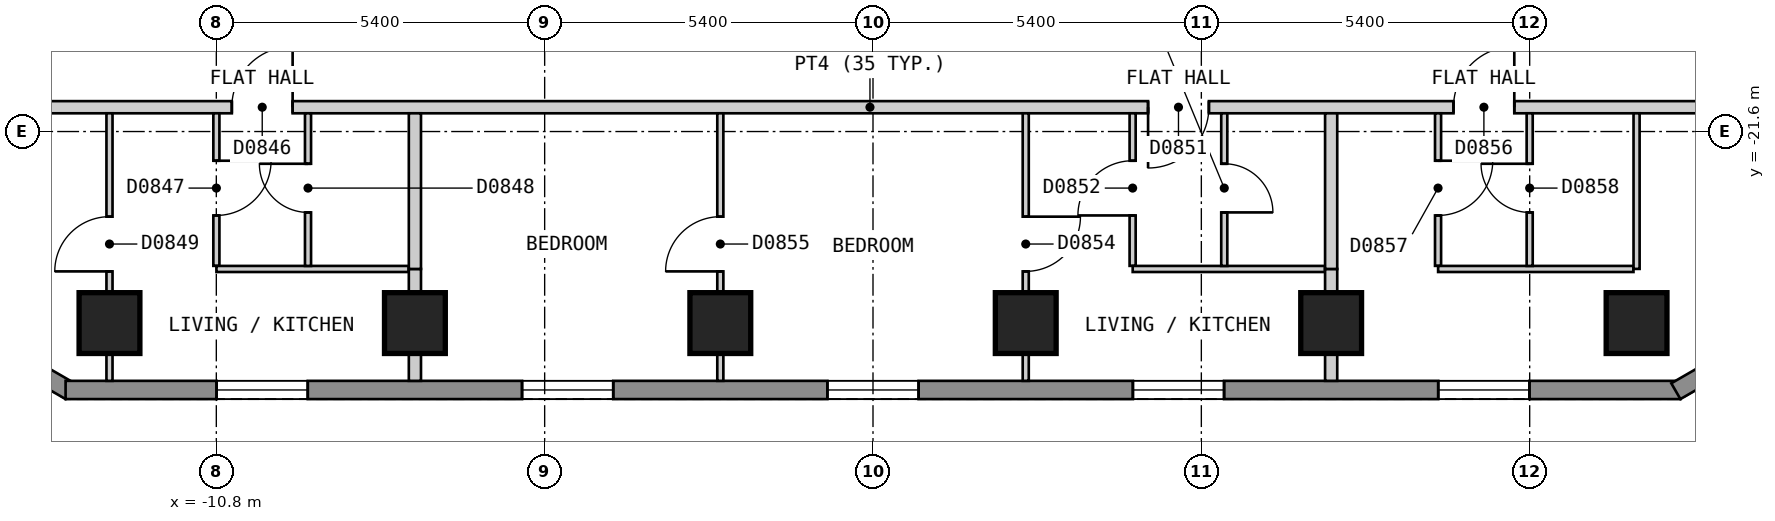
"""IFC4 building model, lengths in metres.
Left out: names, types, materials, properties, quantities, classifications, styles, units other than length and angle.
Written with IfcOpenShell. Run it as: python <this file> out.ifc"""

import sys

from ifc_helpers import new_model, si_unit, direction, frame, frame_2d, origin, origin_2d, place, context, subcontext, project, spatial, polyline, rectangle, outline, extrude, element, fill, save


model = new_model("IFC4")
c1 = context("Model", 3, precision=1e-05, world=origin(), true_north=direction((0.0, 1.0)))
c2 = subcontext(c1, "Body", "Model", "MODEL_VIEW")
j1 = project(units=[si_unit("LENGTHUNIT", "METRE"), si_unit("PLANEANGLEUNIT", "RADIAN")], contexts=[c1])
p1 = place(None, origin())
s1 = spatial("IfcSite", under=j1, at=p1, CompositionType="ELEMENT")
p2 = place(p1, origin())
s2 = spatial("IfcBuilding", under=s1, at=p2, CompositionType="ELEMENT")
p3 = place(p2, frame((0.0, 0.0, 72.0)))
s3 = spatial("IfcBuildingStorey", under=s2, at=p3, CompositionType="ELEMENT", Elevation=72.0)
for number, where, z_axis, x_axis in (
    (1, (-12.557, -24.75, 0.0), (0.0, 0.0, 1.0), (1.0, 0.0, 0.0)),
    (2, (-7.534, -24.75, 0.0), (0.0, 0.0, 1.0), (1.0, 0.0, 0.0)),
    (3, (-2.511, -24.75, 0.0), (0.0, 0.0, 1.0), (1.0, 0.0, 0.0)),
    (4, (2.512, -24.75, 0.0), (0.0, 0.0, 1.0), (1.0, 0.0, 0.0)),
    (5, (7.535, -24.75, 0.0), (0.0, 0.0, 1.0), (1.0, 0.0, 0.0)),
    (6, (12.558, -24.75, 0.0), (0.0, 0.0, 1.0), (1.0, 0.0, 0.0)),
):
    element("IfcColumn", number, at=place(p3, frame(where, z_axis=z_axis, x_axis=x_axis)), inside=s3, PredefinedType="COLUMN", context=c2, shape_type="SweptSolid", body=[
        extrude(rectangle(XDim=1.0, YDim=1.0, at=origin_2d()), origin(), (0.0, 0.0, 1.0), 3.0),
    ])
p4 = place(p3, frame((-17.534, -23.37, 0.0), z_axis=(0.0, 0.0, 1.0), x_axis=(0.866010750942, -0.50002537861, 0.0)))
e7 = element("IfcWall", 7, at=p4, inside=s3, PredefinedType="SOLIDWALL", context=c2, shape_type="SweptSolid", body=[
    extrude(outline(polyline([(0.0, -0.15), (5.0, -0.15), (4.919, 0.15), (0.08, 0.15), (0.0, -0.15)])), origin(), (0.0, 0.0, 1.0), 2.7),
])
p5 = place(p4, frame((0.65, 0.0, 0.15)))
e8 = element("IfcOpeningElement", 8, at=p5, cuts=e7, PredefinedType="OPENING", context=c2, shape_type="SweptSolid", body=[
    extrude(rectangle(XDim=1.2, YDim=2.1, at=frame_2d((0.6, 1.05))), frame((0.0, 0.16, 0.0), z_axis=(0.0, -1.0, 0.0), x_axis=(1.0, 0.0, 0.0)), (0.0, 0.0, 1.0), 0.32),
])
p6 = place(p3, frame((-13.279, -25.85, 0.0), z_axis=(0.0, 0.0, 1.0), x_axis=(1.0, 0.0, 0.0)))
e9 = element("IfcWall", 9, at=p6, inside=s3, PredefinedType="SOLIDWALL", context=c2, shape_type="SweptSolid", body=[
    extrude(outline(polyline([(0.0, -0.15), (26.558, -0.15), (26.478, 0.15), (0.08, 0.15), (0.0, -0.15)])), origin(), (0.0, 0.0, 1.0), 2.7),
])
p7 = place(p6, frame((2.483, 0.0, 0.15)))
e10 = element("IfcOpeningElement", 10, at=p7, cuts=e9, PredefinedType="OPENING", context=c2, shape_type="SweptSolid", body=[
    extrude(rectangle(XDim=1.5, YDim=2.1, at=frame_2d((0.75, 1.05))), frame((0.0, 0.16, 0.0), z_axis=(0.0, -1.0, 0.0), x_axis=(1.0, 0.0, 0.0)), (0.0, 0.0, 1.0), 0.32),
])
p8 = place(p6, frame((7.507, 0.0, 0.15)))
e11 = element("IfcOpeningElement", 11, at=p8, cuts=e9, PredefinedType="OPENING", context=c2, shape_type="SweptSolid", body=[
    extrude(rectangle(XDim=1.5, YDim=2.1, at=frame_2d((0.75, 1.05))), frame((0.0, 0.16, 0.0), z_axis=(0.0, -1.0, 0.0), x_axis=(1.0, 0.0, 0.0)), (0.0, 0.0, 1.0), 0.32),
])
p9 = place(p6, frame((12.529, 0.0, 0.15)))
e12 = element("IfcOpeningElement", 12, at=p9, cuts=e9, PredefinedType="OPENING", context=c2, shape_type="SweptSolid", body=[
    extrude(rectangle(XDim=1.5, YDim=2.1, at=frame_2d((0.75, 1.05))), frame((0.0, 0.16, 0.0), z_axis=(0.0, -1.0, 0.0), x_axis=(1.0, 0.0, 0.0)), (0.0, 0.0, 1.0), 0.32),
])
p10 = place(p6, frame((17.553, 0.0, 0.15)))
e13 = element("IfcOpeningElement", 13, at=p10, cuts=e9, PredefinedType="OPENING", context=c2, shape_type="SweptSolid", body=[
    extrude(rectangle(XDim=1.5, YDim=2.1, at=frame_2d((0.75, 1.05))), frame((0.0, 0.16, 0.0), z_axis=(0.0, -1.0, 0.0), x_axis=(1.0, 0.0, 0.0)), (0.0, 0.0, 1.0), 0.32),
])
p11 = place(p6, frame((22.575, 0.0, 0.15)))
e14 = element("IfcOpeningElement", 14, at=p11, cuts=e9, PredefinedType="OPENING", context=c2, shape_type="SweptSolid", body=[
    extrude(rectangle(XDim=1.5, YDim=2.1, at=frame_2d((0.75, 1.05))), frame((0.0, 0.16, 0.0), z_axis=(0.0, -1.0, 0.0), x_axis=(1.0, 0.0, 0.0)), (0.0, 0.0, 1.0), 0.32),
])
p12 = place(p3, frame((13.204, -25.87, 0.0), z_axis=(0.0, 0.0, 1.0), x_axis=(0.866010750942, 0.50002537861, 0.0)))
e15 = element("IfcWall", 15, at=p12, inside=s3, PredefinedType="SOLIDWALL", context=c2, shape_type="SweptSolid", body=[
    extrude(outline(polyline([(0.0, -0.15), (5.0, -0.15), (4.919, 0.15), (0.08, 0.15), (0.0, -0.15)])), origin(), (0.0, 0.0, 1.0), 2.7),
])
p13 = place(p12, frame((0.65, 0.0, 0.15)))
e16 = element("IfcOpeningElement", 16, at=p13, cuts=e15, PredefinedType="OPENING", context=c2, shape_type="SweptSolid", body=[
    extrude(rectangle(XDim=1.2, YDim=2.1, at=frame_2d((0.6, 1.05))), frame((0.0, 0.16, 0.0), z_axis=(0.0, -1.0, 0.0), x_axis=(1.0, 0.0, 0.0)), (0.0, 0.0, 1.0), 0.32),
])
p14 = place(p3, frame((-15.499, -21.2, 0.0), z_axis=(0.0, 0.0, 1.0), x_axis=(1.0, 0.0, 0.0)))
e17 = element("IfcWall", 17, at=p14, inside=s3, PredefinedType="PARTITIONING", context=c2, shape_type="SweptSolid", body=[
    extrude(rectangle(XDim=30.898, YDim=0.2, at=frame_2d((15.449, 0.0))), origin(), (0.0, 0.0, 1.0), 2.7),
])
p15 = place(p14, frame((4.954, 0.0, 0.0)))
e18 = element("IfcOpeningElement", 18, at=p15, cuts=e17, PredefinedType="OPENING", context=c2, shape_type="SweptSolid", body=[
    extrude(rectangle(XDim=1.0, YDim=2.1, at=frame_2d((0.5, 1.05))), frame((0.0, 0.11, 0.0), z_axis=(0.0, -1.0, 0.0), x_axis=(1.0, 0.0, 0.0)), (0.0, 0.0, 1.0), 0.22),
])
p16 = place(p14, frame((20.023, 0.0, 0.0)))
e19 = element("IfcOpeningElement", 19, at=p16, cuts=e17, PredefinedType="OPENING", context=c2, shape_type="SweptSolid", body=[
    extrude(rectangle(XDim=1.0, YDim=2.1, at=frame_2d((0.5, 1.05))), frame((0.0, 0.11, 0.0), z_axis=(0.0, -1.0, 0.0), x_axis=(1.0, 0.0, 0.0)), (0.0, 0.0, 1.0), 0.22),
])
p17 = place(p14, frame((25.046, 0.0, 0.0)))
e20 = element("IfcOpeningElement", 20, at=p17, cuts=e17, PredefinedType="OPENING", context=c2, shape_type="SweptSolid", body=[
    extrude(rectangle(XDim=1.0, YDim=2.1, at=frame_2d((0.5, 1.05))), frame((0.0, 0.11, 0.0), z_axis=(0.0, -1.0, 0.0), x_axis=(1.0, 0.0, 0.0)), (0.0, 0.0, 1.0), 0.22),
])
p18 = place(p3, frame((-10.799, -21.3, 0.0), z_axis=(0.0, 0.0, 1.0), x_axis=(0.0, -1.0, 0.0)))
e21 = element("IfcWall", 21, at=p18, inside=s3, PredefinedType="PARTITIONING", context=c2, shape_type="SweptSolid", body=[
    extrude(rectangle(XDim=2.509, YDim=0.1, at=frame_2d((1.254, 0.0))), origin(), (0.0, 0.0, 1.0), 2.7),
])
p19 = place(p18, frame((0.78, 0.0, 0.0)))
e22 = element("IfcOpeningElement", 22, at=p19, cuts=e21, PredefinedType="OPENING", context=c2, shape_type="SweptSolid", body=[
    extrude(rectangle(XDim=0.9, YDim=2.1, at=frame_2d((0.45, 1.05))), frame((0.0, 0.06, 0.0), z_axis=(0.0, -1.0, 0.0), x_axis=(1.0, 0.0, 0.0)), (0.0, 0.0, 1.0), 0.12),
])
p20 = place(p3, frame((4.27, -21.3, 0.0), z_axis=(0.0, 0.0, 1.0), x_axis=(0.0, -1.0, 0.0)))
e23 = element("IfcWall", 23, at=p20, inside=s3, PredefinedType="PARTITIONING", context=c2, shape_type="SweptSolid", body=[
    extrude(rectangle(XDim=2.509, YDim=0.1, at=frame_2d((1.254, 0.0))), origin(), (0.0, 0.0, 1.0), 2.7),
])
p21 = place(p20, frame((0.78, 0.0, 0.0)))
e24 = element("IfcOpeningElement", 24, at=p21, cuts=e23, PredefinedType="OPENING", context=c2, shape_type="SweptSolid", body=[
    extrude(rectangle(XDim=0.9, YDim=2.1, at=frame_2d((0.45, 1.05))), frame((0.0, 0.06, 0.0), z_axis=(0.0, -1.0, 0.0), x_axis=(1.0, 0.0, 0.0)), (0.0, 0.0, 1.0), 0.12),
])
p22 = place(p3, frame((9.293, -21.3, 0.0), z_axis=(0.0, 0.0, 1.0), x_axis=(0.0, -1.0, 0.0)))
e25 = element("IfcWall", 25, at=p22, inside=s3, PredefinedType="PARTITIONING", context=c2, shape_type="SweptSolid", body=[
    extrude(rectangle(XDim=2.509, YDim=0.1, at=frame_2d((1.254, 0.0))), origin(), (0.0, 0.0, 1.0), 2.7),
])
p23 = place(p22, frame((0.78, 0.0, 0.0)))
e26 = element("IfcOpeningElement", 26, at=p23, cuts=e25, PredefinedType="OPENING", context=c2, shape_type="SweptSolid", body=[
    extrude(rectangle(XDim=0.9, YDim=2.1, at=frame_2d((0.45, 1.05))), frame((0.0, 0.06, 0.0), z_axis=(0.0, -1.0, 0.0), x_axis=(1.0, 0.0, 0.0)), (0.0, 0.0, 1.0), 0.12),
])
for number, where, z_axis, x_axis in (
    (27, (-10.798, -23.86, 0.0), (0.0, 0.0, 1.0), (1.0, 0.0, 0.0)),
    (28, (4.271, -23.86, 0.0), (0.0, 0.0, 1.0), (1.0, 0.0, 0.0)),
):
    element("IfcWall", number, at=place(p3, frame(where, z_axis=z_axis, x_axis=x_axis)), inside=s3, PredefinedType="PARTITIONING", context=c2, shape_type="SweptSolid", body=[
        extrude(rectangle(XDim=3.164, YDim=0.1, at=frame_2d((1.582, 0.0))), origin(), (0.0, 0.0, 1.0), 2.7),
    ])
p24 = place(p3, frame((9.294, -23.86, 0.0), z_axis=(0.0, 0.0, 1.0), x_axis=(1.0, 0.0, 0.0)))
e29 = element("IfcWall", 29, at=p24, inside=s3, PredefinedType="PARTITIONING", context=c2, shape_type="SweptSolid", body=[
    extrude(rectangle(XDim=3.213, YDim=0.1, at=frame_2d((1.606, 0.0))), origin(), (0.0, 0.0, 1.0), 2.7),
])
p25 = place(p3, frame((5.777, -23.81, 0.0), z_axis=(0.0, 0.0, 1.0), x_axis=(0.0, 1.0, 0.0)))
e30 = element("IfcWall", 30, at=p25, inside=s3, PredefinedType="PARTITIONING", context=c2, shape_type="SweptSolid", body=[
    extrude(rectangle(XDim=2.51, YDim=0.1, at=frame_2d((1.255, 0.0))), origin(), (0.0, 0.0, 1.0), 2.7),
])
p26 = place(p25, frame((0.88, 0.0, 0.0)))
e31 = element("IfcOpeningElement", 31, at=p26, cuts=e30, PredefinedType="OPENING", context=c2, shape_type="SweptSolid", body=[
    extrude(rectangle(XDim=0.8, YDim=2.1, at=frame_2d((0.4, 1.05))), frame((0.0, 0.06, 0.0), z_axis=(0.0, -1.0, 0.0), x_axis=(1.0, 0.0, 0.0)), (0.0, 0.0, 1.0), 0.12),
])
p27 = place(p3, frame((10.8, -23.81, 0.0), z_axis=(0.0, 0.0, 1.0), x_axis=(0.0, 1.0, 0.0)))
e32 = element("IfcWall", 32, at=p27, inside=s3, PredefinedType="PARTITIONING", context=c2, shape_type="SweptSolid", body=[
    extrude(rectangle(XDim=2.51, YDim=0.1, at=frame_2d((1.255, 0.0))), origin(), (0.0, 0.0, 1.0), 2.7),
])
p28 = place(p27, frame((0.88, 0.0, 0.0)))
e33 = element("IfcOpeningElement", 33, at=p28, cuts=e32, PredefinedType="OPENING", context=c2, shape_type="SweptSolid", body=[
    extrude(rectangle(XDim=0.8, YDim=2.1, at=frame_2d((0.4, 1.05))), frame((0.0, 0.06, 0.0), z_axis=(0.0, -1.0, 0.0), x_axis=(1.0, 0.0, 0.0)), (0.0, 0.0, 1.0), 0.12),
])
p29 = place(p3, frame((12.558, -23.859, 0.0), z_axis=(0.0, 0.0, 1.0), x_axis=(0.0, 1.0, 0.0)))
e34 = element("IfcWall", 34, at=p29, inside=s3, PredefinedType="PARTITIONING", context=c2, shape_type="SweptSolid", body=[
    extrude(rectangle(XDim=2.559, YDim=0.1, at=frame_2d((1.279, 0.0))), origin(), (0.0, 0.0, 1.0), 2.7),
])
p30 = place(p3, frame((2.512, -25.7, 0.0), z_axis=(0.0, 0.0, 1.0), x_axis=(0.0, 1.0, 0.0)))
e35 = element("IfcWall", 35, at=p30, inside=s3, PredefinedType="PARTITIONING", context=c2, shape_type="SweptSolid", body=[
    extrude(rectangle(XDim=4.4, YDim=0.1, at=frame_2d((2.2, 0.0))), origin(), (0.0, 0.0, 1.0), 2.7),
])
p31 = place(p30, frame((1.8, 0.0, 0.0)))
e36 = element("IfcOpeningElement", 36, at=p31, cuts=e35, PredefinedType="OPENING", context=c2, shape_type="SweptSolid", body=[
    extrude(rectangle(XDim=0.9, YDim=2.1, at=frame_2d((0.45, 1.05))), frame((0.0, 0.06, 0.0), z_axis=(0.0, -1.0, 0.0), x_axis=(1.0, 0.0, 0.0)), (0.0, 0.0, 1.0), 0.12),
])
p32 = place(p3, frame((-9.292, -23.81, 0.0), z_axis=(0.0, 0.0, 1.0), x_axis=(0.0, 1.0, 0.0)))
e37 = element("IfcWall", 37, at=p32, inside=s3, PredefinedType="PARTITIONING", context=c2, shape_type="SweptSolid", body=[
    extrude(rectangle(XDim=2.51, YDim=0.1, at=frame_2d((1.255, 0.0))), origin(), (0.0, 0.0, 1.0), 2.7),
])
p33 = place(p32, frame((0.88, 0.0, 0.0)))
e38 = element("IfcOpeningElement", 38, at=p33, cuts=e37, PredefinedType="OPENING", context=c2, shape_type="SweptSolid", body=[
    extrude(rectangle(XDim=0.8, YDim=2.1, at=frame_2d((0.4, 1.05))), frame((0.0, 0.06, 0.0), z_axis=(0.0, -1.0, 0.0), x_axis=(1.0, 0.0, 0.0)), (0.0, 0.0, 1.0), 0.12),
])
p34 = place(p3, frame((-12.557, -25.7, 0.0), z_axis=(0.0, 0.0, 1.0), x_axis=(0.0, 1.0, 0.0)))
e39 = element("IfcWall", 39, at=p34, inside=s3, PredefinedType="PARTITIONING", context=c2, shape_type="SweptSolid", body=[
    extrude(rectangle(XDim=4.4, YDim=0.1, at=frame_2d((2.2, 0.0))), origin(), (0.0, 0.0, 1.0), 2.7),
])
p35 = place(p34, frame((1.8, 0.0, 0.0)))
e40 = element("IfcOpeningElement", 40, at=p35, cuts=e39, PredefinedType="OPENING", context=c2, shape_type="SweptSolid", body=[
    extrude(rectangle(XDim=0.9, YDim=2.1, at=frame_2d((0.45, 1.05))), frame((0.0, 0.06, 0.0), z_axis=(0.0, -1.0, 0.0), x_axis=(1.0, 0.0, 0.0)), (0.0, 0.0, 1.0), 0.12),
])
p36 = place(p3, frame((-2.511, -25.7, 0.0), z_axis=(0.0, 0.0, 1.0), x_axis=(0.0, 1.0, 0.0)))
e41 = element("IfcWall", 41, at=p36, inside=s3, PredefinedType="PARTITIONING", context=c2, shape_type="SweptSolid", body=[
    extrude(rectangle(XDim=4.4, YDim=0.1, at=frame_2d((2.2, 0.0))), origin(), (0.0, 0.0, 1.0), 2.7),
])
p37 = place(p36, frame((1.8, 0.0, 0.0)))
e42 = element("IfcOpeningElement", 42, at=p37, cuts=e41, PredefinedType="OPENING", context=c2, shape_type="SweptSolid", body=[
    extrude(rectangle(XDim=0.9, YDim=2.1, at=frame_2d((0.45, 1.05))), frame((0.0, 0.06, 0.0), z_axis=(0.0, -1.0, 0.0), x_axis=(1.0, 0.0, 0.0)), (0.0, 0.0, 1.0), 0.12),
])
for number, where, z_axis, x_axis in (
    (43, (-7.534, -23.86, 0.0), (0.0, 0.0, 1.0), (0.0, -1.0, 0.0)),
    (44, (7.535, -23.86, 0.0), (0.0, 0.0, 1.0), (0.0, -1.0, 0.0)),
):
    element("IfcWall", number, at=place(p3, frame(where, z_axis=z_axis, x_axis=x_axis)), inside=s3, PredefinedType="PARTITIONING", context=c2, shape_type="SweptSolid", body=[
        extrude(rectangle(XDim=1.84, YDim=0.2, at=frame_2d((0.92, 0.0))), origin(), (0.0, 0.0, 1.0), 2.7),
    ])
for number, where, z_axis, x_axis in (
    (45, (7.535, -23.86, 0.0), (0.0, 0.0, 1.0), (0.0, 1.0, 0.0)),
    (46, (-7.534, -23.86, 0.0), (0.0, 0.0, 1.0), (0.0, 1.0, 0.0)),
):
    element("IfcWall", number, at=place(p3, frame(where, z_axis=z_axis, x_axis=x_axis)), inside=s3, PredefinedType="PARTITIONING", context=c2, shape_type="SweptSolid", body=[
        extrude(rectangle(XDim=2.56, YDim=0.2, at=frame_2d((1.28, 0.0))), origin(), (0.0, 0.0, 1.0), 2.7),
    ])
p38 = place(p7, origin())
e47 = element("IfcWindow", 47, at=p38, inside=s3, PartitioningType="SINGLE_PANEL", PredefinedType="WINDOW", context=c2, shape_type="SweptSolid", body=[
    extrude(rectangle(XDim=1.5, YDim=2.1, at=frame_2d((0.75, 1.05))), frame((0.0, 0.03, 0.0), z_axis=(0.0, -1.0, 0.0), x_axis=(1.0, 0.0, 0.0)), (0.0, 0.0, 1.0), 0.06),
])
fill(e10, e47)
p39 = place(p8, origin())
e48 = element("IfcWindow", 48, at=p39, inside=s3, PartitioningType="SINGLE_PANEL", PredefinedType="WINDOW", context=c2, shape_type="SweptSolid", body=[
    extrude(rectangle(XDim=1.5, YDim=2.1, at=frame_2d((0.75, 1.05))), frame((0.0, 0.03, 0.0), z_axis=(0.0, -1.0, 0.0), x_axis=(1.0, 0.0, 0.0)), (0.0, 0.0, 1.0), 0.06),
])
fill(e11, e48)
p40 = place(p9, origin())
e49 = element("IfcWindow", 49, at=p40, inside=s3, PartitioningType="SINGLE_PANEL", PredefinedType="WINDOW", context=c2, shape_type="SweptSolid", body=[
    extrude(rectangle(XDim=1.5, YDim=2.1, at=frame_2d((0.75, 1.05))), frame((0.0, 0.03, 0.0), z_axis=(0.0, -1.0, 0.0), x_axis=(1.0, 0.0, 0.0)), (0.0, 0.0, 1.0), 0.06),
])
fill(e12, e49)
p41 = place(p10, origin())
e50 = element("IfcWindow", 50, at=p41, inside=s3, PartitioningType="SINGLE_PANEL", PredefinedType="WINDOW", context=c2, shape_type="SweptSolid", body=[
    extrude(rectangle(XDim=1.5, YDim=2.1, at=frame_2d((0.75, 1.05))), frame((0.0, 0.03, 0.0), z_axis=(0.0, -1.0, 0.0), x_axis=(1.0, 0.0, 0.0)), (0.0, 0.0, 1.0), 0.06),
])
fill(e13, e50)
p42 = place(p11, origin())
e51 = element("IfcWindow", 51, at=p42, inside=s3, PartitioningType="SINGLE_PANEL", PredefinedType="WINDOW", context=c2, shape_type="SweptSolid", body=[
    extrude(rectangle(XDim=1.5, YDim=2.1, at=frame_2d((0.75, 1.05))), frame((0.0, 0.03, 0.0), z_axis=(0.0, -1.0, 0.0), x_axis=(1.0, 0.0, 0.0)), (0.0, 0.0, 1.0), 0.06),
])
fill(e14, e51)
p43 = place(p15, origin())
e52 = element("IfcDoor", 52, at=p43, inside=s3, OperationType="SINGLE_SWING_RIGHT", PredefinedType="DOOR", context=c2, shape_type="SweptSolid", body=[
    extrude(rectangle(XDim=1.0, YDim=2.1, at=frame_2d((0.5, 1.05))), frame((0.0, 0.025, 0.0), z_axis=(0.0, -1.0, 0.0), x_axis=(1.0, 0.0, 0.0)), (0.0, 0.0, 1.0), 0.05),
])
fill(e18, e52)
p44 = place(p19, origin())
e53 = element("IfcDoor", 53, at=p44, inside=s3, OperationType="SINGLE_SWING_LEFT", PredefinedType="DOOR", context=c2, shape_type="SweptSolid", body=[
    extrude(rectangle(XDim=0.9, YDim=2.1, at=frame_2d((0.45, 1.05))), frame((0.0, 0.025, 0.0), z_axis=(0.0, -1.0, 0.0), x_axis=(1.0, 0.0, 0.0)), (0.0, 0.0, 1.0), 0.05),
])
fill(e22, e53)
p45 = place(p33, origin())
e54 = element("IfcDoor", 54, at=p45, inside=s3, OperationType="SINGLE_SWING_RIGHT", PredefinedType="DOOR", context=c2, shape_type="SweptSolid", body=[
    extrude(rectangle(XDim=0.8, YDim=2.1, at=frame_2d((0.4, 1.05))), frame((0.0, 0.025, 0.0), z_axis=(0.0, -1.0, 0.0), x_axis=(1.0, 0.0, 0.0)), (0.0, 0.0, 1.0), 0.05),
])
fill(e38, e54)
p46 = place(p35, origin())
e55 = element("IfcDoor", 55, at=p46, inside=s3, OperationType="SINGLE_SWING_LEFT", PredefinedType="DOOR", context=c2, shape_type="SweptSolid", body=[
    extrude(rectangle(XDim=0.9, YDim=2.1, at=frame_2d((0.45, 1.05))), frame((0.0, 0.025, 0.0), z_axis=(0.0, -1.0, 0.0), x_axis=(1.0, 0.0, 0.0)), (0.0, 0.0, 1.0), 0.05),
])
fill(e40, e55)
p47 = place(p16, origin())
e56 = element("IfcDoor", 56, at=p47, inside=s3, OperationType="SINGLE_SWING_LEFT", PredefinedType="DOOR", context=c2, shape_type="SweptSolid", body=[
    extrude(rectangle(XDim=1.0, YDim=2.1, at=frame_2d((0.5, 1.05))), frame((0.0, 0.025, 0.0), z_axis=(0.0, -1.0, 0.0), x_axis=(1.0, 0.0, 0.0)), (0.0, 0.0, 1.0), 0.05),
])
fill(e19, e56)
p48 = place(p21, origin())
e57 = element("IfcDoor", 57, at=p48, inside=s3, OperationType="SINGLE_SWING_RIGHT", PredefinedType="DOOR", context=c2, shape_type="SweptSolid", body=[
    extrude(rectangle(XDim=0.9, YDim=2.1, at=frame_2d((0.45, 1.05))), frame((0.0, 0.025, 0.0), z_axis=(0.0, -1.0, 0.0), x_axis=(1.0, 0.0, 0.0)), (0.0, 0.0, 1.0), 0.05),
])
fill(e24, e57)
p49 = place(p26, origin())
e58 = element("IfcDoor", 58, at=p49, inside=s3, OperationType="SINGLE_SWING_LEFT", PredefinedType="DOOR", context=c2, shape_type="SweptSolid", body=[
    extrude(rectangle(XDim=0.8, YDim=2.1, at=frame_2d((0.4, 1.05))), frame((0.0, 0.025, 0.0), z_axis=(0.0, -1.0, 0.0), x_axis=(1.0, 0.0, 0.0)), (0.0, 0.0, 1.0), 0.05),
])
fill(e31, e58)
p50 = place(p31, origin())
e59 = element("IfcDoor", 59, at=p50, inside=s3, OperationType="SINGLE_SWING_RIGHT", PredefinedType="DOOR", context=c2, shape_type="SweptSolid", body=[
    extrude(rectangle(XDim=0.9, YDim=2.1, at=frame_2d((0.45, 1.05))), frame((0.0, 0.025, 0.0), z_axis=(0.0, -1.0, 0.0), x_axis=(1.0, 0.0, 0.0)), (0.0, 0.0, 1.0), 0.05),
])
fill(e36, e59)
p51 = place(p37, origin())
e60 = element("IfcDoor", 60, at=p51, inside=s3, OperationType="SINGLE_SWING_LEFT", PredefinedType="DOOR", context=c2, shape_type="SweptSolid", body=[
    extrude(rectangle(XDim=0.9, YDim=2.1, at=frame_2d((0.45, 1.05))), frame((0.0, 0.025, 0.0), z_axis=(0.0, -1.0, 0.0), x_axis=(1.0, 0.0, 0.0)), (0.0, 0.0, 1.0), 0.05),
])
fill(e42, e60)
p52 = place(p17, origin())
e61 = element("IfcDoor", 61, at=p52, inside=s3, OperationType="SINGLE_SWING_RIGHT", PredefinedType="DOOR", context=c2, shape_type="SweptSolid", body=[
    extrude(rectangle(XDim=1.0, YDim=2.1, at=frame_2d((0.5, 1.05))), frame((0.0, 0.025, 0.0), z_axis=(0.0, -1.0, 0.0), x_axis=(1.0, 0.0, 0.0)), (0.0, 0.0, 1.0), 0.05),
])
fill(e20, e61)
p53 = place(p23, origin())
e62 = element("IfcDoor", 62, at=p53, inside=s3, OperationType="SINGLE_SWING_LEFT", PredefinedType="DOOR", context=c2, shape_type="SweptSolid", body=[
    extrude(rectangle(XDim=0.9, YDim=2.1, at=frame_2d((0.45, 1.05))), frame((0.0, 0.025, 0.0), z_axis=(0.0, -1.0, 0.0), x_axis=(1.0, 0.0, 0.0)), (0.0, 0.0, 1.0), 0.05),
])
fill(e26, e62)
p54 = place(p28, origin())
e63 = element("IfcDoor", 63, at=p54, inside=s3, OperationType="SINGLE_SWING_RIGHT", PredefinedType="DOOR", context=c2, shape_type="SweptSolid", body=[
    extrude(rectangle(XDim=0.8, YDim=2.1, at=frame_2d((0.4, 1.05))), frame((0.0, 0.025, 0.0), z_axis=(0.0, -1.0, 0.0), x_axis=(1.0, 0.0, 0.0)), (0.0, 0.0, 1.0), 0.05),
])
fill(e33, e63)
save(model, sys.argv[1])
